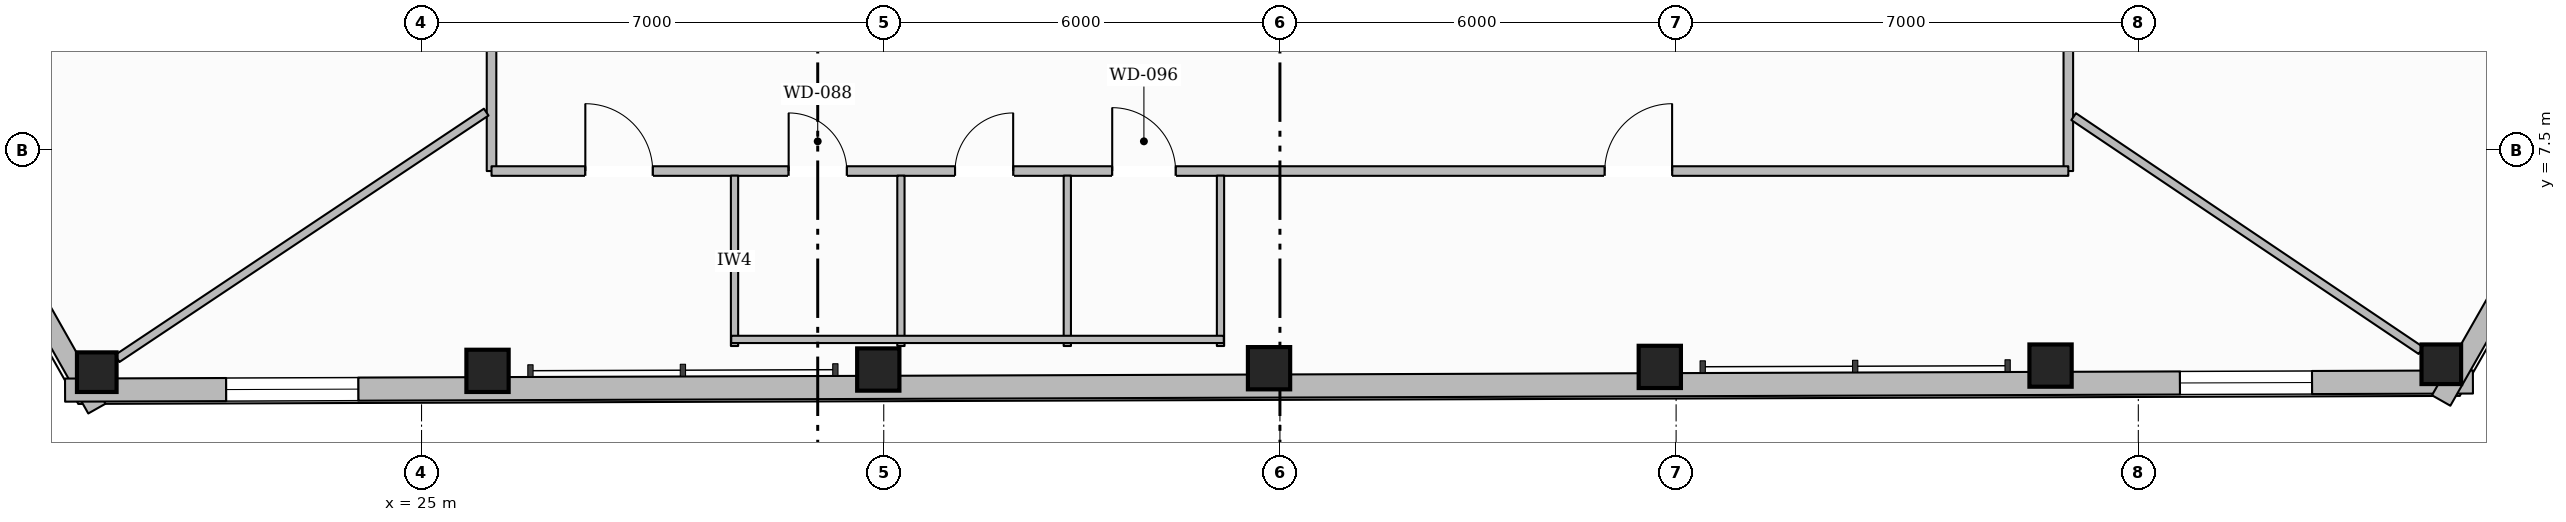
"""IFC4 building model, lengths in metres.
Left out: names, types, materials, properties, quantities, classifications, styles, units other than length and angle.
Written with IfcOpenShell. Run it as: python <this file> out.ifc"""

import sys

from ifc_helpers import new_model, si_unit, direction, frame, frame_2d, origin, origin_2d, place, context, subcontext, project, spatial, rectangle, hollow_rectangle, extrude, element, fill, save


model = new_model("IFC4")
c1 = context("Model", 3, precision=1e-05, world=origin(), true_north=direction((0.0, 1.0)))
c2 = subcontext(c1, "Body", "Model", "MODEL_VIEW")
j1 = project(units=[si_unit("LENGTHUNIT", "METRE"), si_unit("PLANEANGLEUNIT", "RADIAN")], contexts=[c1])
p1 = place(None, origin())
s1 = spatial("IfcSite", under=j1, at=p1, CompositionType="ELEMENT")
p2 = place(p1, origin())
s2 = spatial("IfcBuilding", under=s1, at=p2, CompositionType="ELEMENT")
p3 = place(p2, frame((0.0, 0.0, 160.0)))
s3 = spatial("IfcBuildingStorey", under=s2, at=p3, CompositionType="ELEMENT", Elevation=160.0)
p4 = place(p3, frame((20.082, 4.134, 0.0), z_axis=(0.0, 0.0, 1.0), x_axis=(1.0, 0.0, 0.0)))
e1 = element("IfcColumn", 1, at=p4, inside=s3, PredefinedType="COLUMN", context=c2, shape_type="SweptSolid", body=[
    extrude(hollow_rectangle(XDim=0.6, YDim=0.6, WallThickness=0.028, at=origin_2d()), origin(), (0.0, 0.0, 1.0), 4.75),
])
for number, where, z_axis, x_axis in (
    (2, (26.0, 4.154, 0.0), (0.0, 0.0, 1.0), (1.0, 0.0, 0.0)),
    (3, (31.917, 4.174, 0.0), (0.0, 0.0, 1.0), (1.0, 0.0, 0.0)),
    (4, (37.835, 4.194, 0.0), (0.0, 0.0, 1.0), (1.0, 0.0, 0.0)),
    (5, (43.753, 4.213, 0.0), (0.0, 0.0, 1.0), (1.0, 0.0, 0.0)),
    (6, (49.671, 4.233, 0.0), (0.0, 0.0, 1.0), (1.0, 0.0, 0.0)),
):
    element("IfcColumn", number, at=place(p3, frame(where, z_axis=z_axis, x_axis=x_axis)), inside=s3, PredefinedType="COLUMN", context=c2, shape_type="SweptSolid", body=[
        extrude(hollow_rectangle(XDim=0.64, YDim=0.64, WallThickness=0.028, at=origin_2d()), origin(), (0.0, 0.0, 1.0), 4.75),
    ])
p5 = place(p3, frame((55.589, 4.253, 0.0), z_axis=(0.0, 0.0, 1.0), x_axis=(1.0, 0.0, 0.0)))
e7 = element("IfcColumn", 7, at=p5, inside=s3, PredefinedType="COLUMN", context=c2, shape_type="SweptSolid", body=[
    extrude(hollow_rectangle(XDim=0.6, YDim=0.6, WallThickness=0.028, at=origin_2d()), origin(), (0.0, 0.0, 1.0), 4.75),
])
p6 = place(p3, frame((20.083, 3.582, 0.0), z_axis=(0.0, 0.0, 1.0), x_axis=(-0.492483138228, 0.870321985567, 0.0)))
e8 = element("IfcWall", 8, at=p6, inside=s3, PredefinedType="STANDARD", context=c2, shape_type="SweptSolid", body=[
    extrude(rectangle(XDim=10.671, YDim=0.3, at=frame_2d((5.335, 0.0))), origin(), (0.0, 0.0, 1.0), 4.282),
])
p7 = place(p6, frame((4.811, 0.0, 0.65)))
e9 = element("IfcOpeningElement", 9, at=p7, cuts=e8, PredefinedType="OPENING", context=c2, shape_type="SweptSolid", body=[
    extrude(rectangle(XDim=1.05, YDim=1.7, at=frame_2d((0.525, 0.85))), frame((0.0, 0.16, 0.0), z_axis=(0.0, -1.0, 0.0), x_axis=(1.0, 0.0, 0.0)), (0.0, 0.0, 1.0), 0.32),
])
p8 = place(p3, frame((56.067, 3.985, 0.0), z_axis=(0.0, 0.0, 1.0), x_axis=(-0.999994307151, -0.003374265262, 0.0)))
e10 = element("IfcWall", 10, at=p8, inside=s3, PredefinedType="STANDARD", context=c2, shape_type="SweptSolid", body=[
    extrude(rectangle(XDim=36.466, YDim=0.35, at=frame_2d((18.233, 0.0))), origin(), (0.0, 0.0, 1.0), 4.282),
])
p9 = place(p8, frame((32.026, 0.0, 0.65)))
e11 = element("IfcOpeningElement", 11, at=p9, cuts=e10, PredefinedType="OPENING", context=c2, shape_type="SweptSolid", body=[
    extrude(rectangle(XDim=2.0, YDim=2.25, at=frame_2d((1.0, 1.125))), frame((0.0, 0.185, 0.0), z_axis=(0.0, -1.0, 0.0), x_axis=(1.0, 0.0, 0.0)), (0.0, 0.0, 1.0), 0.37),
])
p10 = place(p8, frame((2.437, 0.0, 0.65)))
e12 = element("IfcOpeningElement", 12, at=p10, cuts=e10, PredefinedType="OPENING", context=c2, shape_type="SweptSolid", body=[
    extrude(rectangle(XDim=2.0, YDim=2.25, at=frame_2d((1.0, 1.125))), frame((0.0, 0.185, 0.0), z_axis=(0.0, -1.0, 0.0), x_axis=(1.0, 0.0, 0.0)), (0.0, 0.0, 1.0), 0.37),
])
p11 = place(p3, frame((60.903, 13.026, 0.0), z_axis=(0.0, 0.0, 1.0), x_axis=(-0.495408589086, -0.86866007728, 0.0)))
e13 = element("IfcWall", 13, at=p11, inside=s3, PredefinedType="STANDARD", context=c2, shape_type="SweptSolid", body=[
    extrude(rectangle(XDim=10.73, YDim=0.32, at=frame_2d((5.365, 0.0))), origin(), (0.0, 0.0, 1.0), 4.282),
])
p12 = place(p11, frame((4.84, 0.0, 0.65)))
e14 = element("IfcOpeningElement", 14, at=p12, cuts=e13, PredefinedType="OPENING", context=c2, shape_type="SweptSolid", body=[
    extrude(rectangle(XDim=1.05, YDim=1.7, at=frame_2d((0.525, 0.85))), frame((0.0, 0.17, 0.0), z_axis=(0.0, -1.0, 0.0), x_axis=(1.0, 0.0, 0.0)), (0.0, 0.0, 1.0), 0.34),
])
p13 = place(p3, frame((49.94, 7.18, 0.0), z_axis=(0.0, 0.0, 1.0), x_axis=(0.0, 1.0, 0.0)))
e15 = element("IfcWall", 15, at=p13, inside=s3, PredefinedType="PARTITIONING", context=c2, shape_type="SweptSolid", body=[
    extrude(rectangle(XDim=17.84, YDim=0.145, at=frame_2d((8.92, 0.0))), origin(), (0.0, 0.0, 1.0), 4.489),
])
p14 = place(p13, frame((6.756, 0.0, 0.0)))
e16 = element("IfcOpeningElement", 16, at=p14, cuts=e15, PredefinedType="OPENING", context=c2, shape_type="SweptSolid", body=[
    extrude(rectangle(XDim=1.4, YDim=2.2, at=frame_2d((0.7, 1.1))), frame((0.0, 0.083, 0.0), z_axis=(0.0, -1.0, 0.0), x_axis=(1.0, 0.0, 0.0)), (0.0, 0.0, 1.0), 0.165),
])
p15 = place(p3, frame((26.06, 25.02, 0.0), z_axis=(0.0, 0.0, 1.0), x_axis=(0.0, -1.0, 0.0)))
e17 = element("IfcWall", 17, at=p15, inside=s3, PredefinedType="PARTITIONING", context=c2, shape_type="SweptSolid", body=[
    extrude(rectangle(XDim=17.84, YDim=0.145, at=frame_2d((8.92, 0.0))), origin(), (0.0, 0.0, 1.0), 4.489),
])
p16 = place(p15, frame((9.913, 0.0, 0.0)))
e18 = element("IfcOpeningElement", 18, at=p16, cuts=e17, PredefinedType="OPENING", context=c2, shape_type="SweptSolid", body=[
    extrude(rectangle(XDim=1.02, YDim=2.15, at=frame_2d((0.51, 1.075))), frame((0.0, 0.083, 0.0), z_axis=(0.0, -1.0, 0.0), x_axis=(1.0, 0.0, 0.0)), (0.0, 0.0, 1.0), 0.165),
])
p17 = place(p3, frame((26.06, 7.18, 0.0), z_axis=(0.0, 0.0, 1.0), x_axis=(1.0, 0.0, 0.0)))
e19 = element("IfcWall", 19, at=p17, inside=s3, PredefinedType="PARTITIONING", context=c2, shape_type="SweptSolid", body=[
    extrude(rectangle(XDim=23.88, YDim=0.145, at=frame_2d((11.94, 0.0))), origin(), (0.0, 0.0, 1.0), 4.75),
])
p18 = place(p17, frame((4.5, 0.0, 0.0)))
e20 = element("IfcOpeningElement", 20, at=p18, cuts=e19, PredefinedType="OPENING", context=c2, shape_type="SweptSolid", body=[
    extrude(rectangle(XDim=0.88, YDim=2.1, at=frame_2d((0.44, 1.05))), frame((0.0, 0.083, 0.0), z_axis=(0.0, -1.0, 0.0), x_axis=(1.0, 0.0, 0.0)), (0.0, 0.0, 1.0), 0.165),
])
p19 = place(p17, frame((7.02, 0.0, 0.0)))
e21 = element("IfcOpeningElement", 21, at=p19, cuts=e19, PredefinedType="OPENING", context=c2, shape_type="SweptSolid", body=[
    extrude(rectangle(XDim=0.88, YDim=2.1, at=frame_2d((0.44, 1.05))), frame((0.0, 0.083, 0.0), z_axis=(0.0, -1.0, 0.0), x_axis=(1.0, 0.0, 0.0)), (0.0, 0.0, 1.0), 0.165),
])
p20 = place(p17, frame((9.4, 0.0, 0.0)))
e22 = element("IfcOpeningElement", 22, at=p20, cuts=e19, PredefinedType="OPENING", context=c2, shape_type="SweptSolid", body=[
    extrude(rectangle(XDim=0.96, YDim=2.1, at=frame_2d((0.48, 1.05))), frame((0.0, 0.083, 0.0), z_axis=(0.0, -1.0, 0.0), x_axis=(1.0, 0.0, 0.0)), (0.0, 0.0, 1.0), 0.165),
])
p21 = place(p17, frame((1.421, 0.0, 0.0)))
e23 = element("IfcOpeningElement", 23, at=p21, cuts=e19, PredefinedType="OPENING", context=c2, shape_type="SweptSolid", body=[
    extrude(rectangle(XDim=1.02, YDim=2.15, at=frame_2d((0.51, 1.075))), frame((0.0, 0.083, 0.0), z_axis=(0.0, -1.0, 0.0), x_axis=(1.0, 0.0, 0.0)), (0.0, 0.0, 1.0), 0.165),
])
p22 = place(p17, frame((16.859, 0.0, 0.0)))
e24 = element("IfcOpeningElement", 24, at=p22, cuts=e19, PredefinedType="OPENING", context=c2, shape_type="SweptSolid", body=[
    extrude(rectangle(XDim=1.02, YDim=2.15, at=frame_2d((0.51, 1.075))), frame((0.0, 0.083, 0.0), z_axis=(0.0, -1.0, 0.0), x_axis=(1.0, 0.0, 0.0)), (0.0, 0.0, 1.0), 0.165),
])
for number, where, z_axis, x_axis in (
    (25, (29.74, 4.53, 0.0), (0.0, 0.0, 1.0), (0.0, 1.0, 0.0)),
    (26, (32.26, 4.53, 0.0), (0.0, 0.0, 1.0), (0.0, 1.0, 0.0)),
    (27, (34.78, 4.53, 0.0), (0.0, 0.0, 1.0), (0.0, 1.0, 0.0)),
    (28, (37.1, 4.53, 0.0), (0.0, 0.0, 1.0), (0.0, 1.0, 0.0)),
):
    element("IfcWall", number, at=place(p3, frame(where, z_axis=z_axis, x_axis=x_axis)), inside=s3, PredefinedType="PLUMBINGWALL", context=c2, shape_type="SweptSolid", body=[
        extrude(rectangle(XDim=2.58, YDim=0.11, at=frame_2d((1.29, 0.0))), origin(), (0.0, 0.0, 1.0), 4.75),
    ])
p23 = place(p3, frame((29.69, 4.63, 0.0), z_axis=(0.0, 0.0, 1.0), x_axis=(1.0, 0.0, 0.0)))
e29 = element("IfcWall", 29, at=p23, inside=s3, PredefinedType="PLUMBINGWALL", context=c2, shape_type="SweptSolid", body=[
    extrude(rectangle(XDim=7.46, YDim=0.11, at=frame_2d((3.73, 0.0))), origin(), (0.0, 0.0, 1.0), 4.75),
])
p24 = place(p3, frame((25.979, 8.073, 0.0), z_axis=(0.0, 0.0, 1.0), x_axis=(-0.831608608725, -0.55536215382, 0.0)))
e30 = element("IfcWall", 30, at=p24, inside=s3, PredefinedType="PARTITIONING", context=c2, shape_type="SweptSolid", body=[
    extrude(rectangle(XDim=6.722, YDim=0.125, at=frame_2d((3.361, 0.0))), origin(), (0.0, 0.0, 1.0), 4.291),
])
p25 = place(p3, frame((50.021, 8.004, 0.0), z_axis=(0.0, 0.0, 1.0), x_axis=(0.8294114468, -0.55863821201, 0.0)))
e31 = element("IfcWall", 31, at=p25, inside=s3, PredefinedType="PARTITIONING", context=c2, shape_type="SweptSolid", body=[
    extrude(rectangle(XDim=6.342, YDim=0.125, at=frame_2d((3.171, 0.0))), origin(), (0.0, 0.0, 1.0), 4.291),
])
p26 = place(p9, origin())
e32 = element("IfcWindow", 32, at=p26, inside=s3, PartitioningType="SINGLE_PANEL", PredefinedType="WINDOW", context=c2, shape_type="SweptSolid", body=[
    extrude(rectangle(XDim=2.0, YDim=2.25, at=frame_2d((1.0, 1.125))), frame((0.0, 0.03, 0.0), z_axis=(0.0, -1.0, 0.0), x_axis=(1.0, 0.0, 0.0)), (0.0, 0.0, 1.0), 0.06),
])
fill(e11, e32)
p27 = place(p10, origin())
e33 = element("IfcWindow", 33, at=p27, inside=s3, PartitioningType="SINGLE_PANEL", PredefinedType="WINDOW", context=c2, shape_type="SweptSolid", body=[
    extrude(rectangle(XDim=2.0, YDim=2.25, at=frame_2d((1.0, 1.125))), frame((0.0, 0.03, 0.0), z_axis=(0.0, -1.0, 0.0), x_axis=(1.0, 0.0, 0.0)), (0.0, 0.0, 1.0), 0.06),
])
fill(e12, e33)
p28 = place(p18, origin())
e34 = element("IfcDoor", 34, at=p28, inside=s3, OperationType="SINGLE_SWING_LEFT", PredefinedType="DOOR", context=c2, shape_type="SweptSolid", body=[
    extrude(rectangle(XDim=0.88, YDim=2.1, at=frame_2d((0.44, 1.05))), frame((0.0, 0.025, 0.0), z_axis=(0.0, -1.0, 0.0), x_axis=(1.0, 0.0, 0.0)), (0.0, 0.0, 1.0), 0.05),
])
fill(e20, e34)
p29 = place(p19, origin())
e35 = element("IfcDoor", 35, at=p29, inside=s3, OperationType="SINGLE_SWING_RIGHT", PredefinedType="DOOR", context=c2, shape_type="SweptSolid", body=[
    extrude(rectangle(XDim=0.88, YDim=2.1, at=frame_2d((0.44, 1.05))), frame((0.0, 0.025, 0.0), z_axis=(0.0, -1.0, 0.0), x_axis=(1.0, 0.0, 0.0)), (0.0, 0.0, 1.0), 0.05),
])
fill(e21, e35)
p30 = place(p20, origin())
e36 = element("IfcDoor", 36, at=p30, inside=s3, OperationType="SINGLE_SWING_LEFT", PredefinedType="DOOR", context=c2, shape_type="SweptSolid", body=[
    extrude(rectangle(XDim=0.96, YDim=2.1, at=frame_2d((0.48, 1.05))), frame((0.0, 0.025, 0.0), z_axis=(0.0, -1.0, 0.0), x_axis=(1.0, 0.0, 0.0)), (0.0, 0.0, 1.0), 0.05),
])
fill(e22, e36)
p31 = place(p21, origin())
e37 = element("IfcDoor", 37, at=p31, inside=s3, OperationType="SINGLE_SWING_LEFT", PredefinedType="DOOR", context=c2, shape_type="SweptSolid", body=[
    extrude(rectangle(XDim=1.02, YDim=2.15, at=frame_2d((0.51, 1.075))), frame((0.0, 0.025, 0.0), z_axis=(0.0, -1.0, 0.0), x_axis=(1.0, 0.0, 0.0)), (0.0, 0.0, 1.0), 0.05),
])
fill(e23, e37)
p32 = place(p22, origin())
e38 = element("IfcDoor", 38, at=p32, inside=s3, OperationType="SINGLE_SWING_RIGHT", PredefinedType="DOOR", context=c2, shape_type="SweptSolid", body=[
    extrude(rectangle(XDim=1.02, YDim=2.15, at=frame_2d((0.51, 1.075))), frame((0.0, 0.025, 0.0), z_axis=(0.0, -1.0, 0.0), x_axis=(1.0, 0.0, 0.0)), (0.0, 0.0, 1.0), 0.05),
])
fill(e24, e38)
save(model, sys.argv[1])
